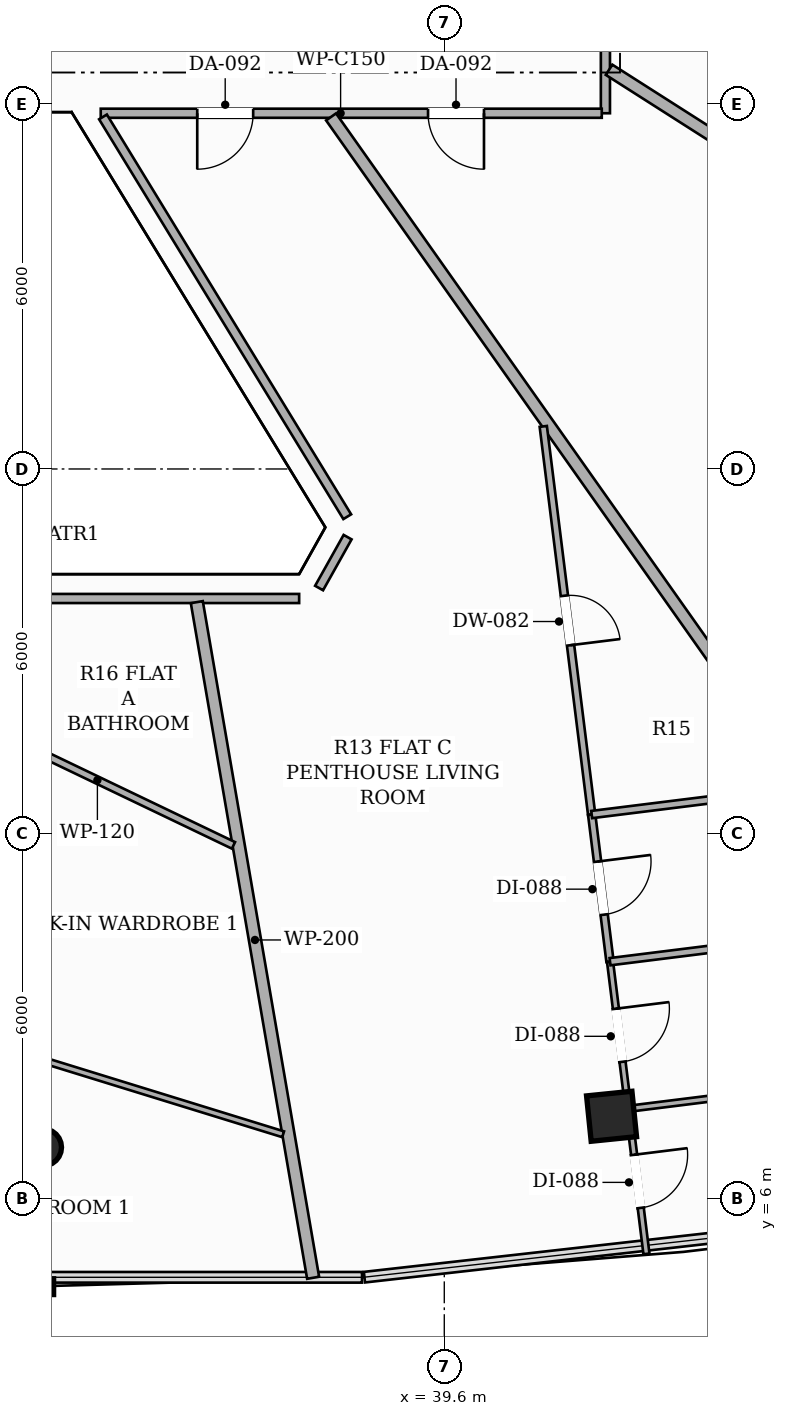
"""IFC4 building model, lengths in metres.
Left out: names, types, materials, properties, quantities, classifications, styles, units other than length and angle.
Written with IfcOpenShell. Run it as: python <this file> out.ifc"""

import sys

from ifc_helpers import new_model, si_unit, direction, frame, frame_2d, origin, origin_2d, place, context, subcontext, project, spatial, rectangle, hollow_rectangle, hollow_circle, extrude, element, fill, save


model = new_model("IFC4")
c1 = context("Model", 3, precision=1e-05, world=origin(), true_north=direction((0.0, 1.0)))
c2 = subcontext(c1, "Body", "Model", "MODEL_VIEW")
j1 = project(units=[si_unit("LENGTHUNIT", "METRE"), si_unit("PLANEANGLEUNIT", "RADIAN")], contexts=[c1])
p1 = place(None, origin())
s1 = spatial("IfcSite", under=j1, at=p1, CompositionType="ELEMENT")
p2 = place(p1, origin())
s2 = spatial("IfcBuilding", under=s1, at=p2, CompositionType="ELEMENT")
p3 = place(p2, frame((0.0, 0.0, 209.6)))
s3 = spatial("IfcBuildingStorey", under=s2, at=p3, CompositionType="ELEMENT", Elevation=209.6)
p4 = place(p3, frame((33.0, 6.844, 0.0), z_axis=(0.0, 0.0, 1.0), x_axis=(1.0, 0.0, 0.0)))
e1 = element("IfcColumn", 1, at=p4, inside=s3, PredefinedType="COLUMN", context=c2, shape_type="SweptSolid", body=[
    extrude(hollow_circle(Radius=0.305, WallThickness=0.016, at=origin_2d()), origin(), (0.0, 0.0, 1.0), 3.3),
])
p5 = place(p3, frame((42.351, 7.355, 0.0), z_axis=(0.0, 0.0, 1.0), x_axis=(0.994880708829, 0.101056297183, 0.0)))
e2 = element("IfcColumn", 2, at=p5, inside=s3, PredefinedType="COLUMN", context=c2, shape_type="SweptSolid", body=[
    extrude(hollow_rectangle(XDim=0.75, YDim=0.75, WallThickness=0.025, at=origin_2d()), origin(), (0.0, 0.0, 1.0), 3.3),
])
p6 = place(p3, frame((42.25, 26.59, 0.0), z_axis=(0.0, 0.0, 1.0), x_axis=(0.0, -1.0, 0.0)))
e3 = element("IfcWall", 3, at=p6, inside=s3, PredefinedType="PARTITIONING", context=c2, shape_type="SweptSolid", body=[
    extrude(rectangle(XDim=2.74, YDim=0.15, at=frame_2d((1.37, 0.0))), origin(), (0.0, 0.0, 1.0), 2.773),
])
p7 = place(p3, frame((42.19, 23.85, 0.0), z_axis=(0.0, 0.0, 1.0), x_axis=(-1.0, 0.0, 0.0)))
e4 = element("IfcWall", 4, at=p7, inside=s3, PredefinedType="PARTITIONING", context=c2, shape_type="SweptSolid", body=[
    extrude(rectangle(XDim=8.24, YDim=0.15, at=frame_2d((4.12, 0.0))), origin(), (0.0, 0.0, 1.0), 2.565),
])
p8 = place(p7, frame((1.937, 0.0, 0.0)))
e5 = element("IfcOpeningElement", 5, at=p8, cuts=e4, PredefinedType="OPENING", context=c2, shape_type="SweptSolid", body=[
    extrude(rectangle(XDim=0.92, YDim=2.15, at=frame_2d((0.46, 1.075))), frame((0.0, 0.085, 0.0), z_axis=(0.0, -1.0, 0.0), x_axis=(1.0, 0.0, 0.0)), (0.0, 0.0, 1.0), 0.17),
])
p9 = place(p7, frame((5.733, 0.0, 0.0)))
e6 = element("IfcOpeningElement", 6, at=p9, cuts=e4, PredefinedType="OPENING", context=c2, shape_type="SweptSolid", body=[
    extrude(rectangle(XDim=0.92, YDim=2.15, at=frame_2d((0.46, 1.075))), frame((0.0, 0.085, 0.0), z_axis=(0.0, -1.0, 0.0), x_axis=(1.0, 0.0, 0.0)), (0.0, 0.0, 1.0), 0.17),
])
p10 = place(p3, frame((33.987, 23.79, 0.0), z_axis=(0.0, 0.0, 1.0), x_axis=(0.521338496894, -0.853349970209, 0.0)))
e7 = element("IfcWall", 7, at=p10, inside=s3, PredefinedType="PARTITIONING", context=c2, shape_type="SweptSolid", body=[
    extrude(rectangle(XDim=7.705, YDim=0.15, at=frame_2d((3.853, 0.0))), origin(), (0.0, 0.0, 1.0), 2.773),
])
p11 = place(p3, frame((38.01, 16.879, 0.0), z_axis=(0.0, 0.0, 1.0), x_axis=(-0.488859069364, -0.872362774481, 0.0)))
e8 = element("IfcWall", 8, at=p11, inside=s3, PredefinedType="PARTITIONING", context=c2, shape_type="SweptSolid", body=[
    extrude(rectangle(XDim=0.959, YDim=0.15, at=frame_2d((0.48, 0.0))), origin(), (0.0, 0.0, 1.0), 3.06),
])
p12 = place(p3, frame((37.213, 15.87, 0.0), z_axis=(0.0, 0.0, 1.0), x_axis=(-1.0, 0.0, 0.0)))
e9 = element("IfcWall", 9, at=p12, inside=s3, PredefinedType="PARTITIONING", context=c2, shape_type="SweptSolid", body=[
    extrude(rectangle(XDim=8.426, YDim=0.15, at=frame_2d((4.213, 0.0))), origin(), (0.0, 0.0, 1.0), 2.773),
])
p13 = place(p3, frame((35.53, 15.81, 0.0), z_axis=(0.0, 0.0, 1.0), x_axis=(0.169681394536, -0.985498972272, 0.0)))
e10 = element("IfcWall", 10, at=p13, inside=s3, PredefinedType="PARTITIONING", context=c2, shape_type="SweptSolid", body=[
    extrude(rectangle(XDim=11.275, YDim=0.2, at=frame_2d((5.637, 0.0))), origin(), (0.0, 0.0, 1.0), 2.492),
])
p14 = place(p3, frame((50.316, 5.976, 0.0), z_axis=(0.0, 0.0, 1.0), x_axis=(-0.576784728977, 0.816896184603, 0.0)))
e11 = element("IfcWall", 11, at=p14, inside=s3, PredefinedType="PARTITIONING", context=c2, shape_type="SweptSolid", body=[
    extrude(rectangle(XDim=21.807, YDim=0.2, at=frame_2d((10.903, 0.0))), origin(), (0.0, 0.0, 1.0), 2.492),
])
p15 = place(p3, frame((42.31, 24.565, 0.0), z_axis=(0.0, 0.0, 1.0), x_axis=(0.843209388644, -0.537585274075, 0.0)))
e12 = element("IfcWall", 12, at=p15, inside=s3, PredefinedType="PARTITIONING", context=c2, shape_type="SweptSolid", body=[
    extrude(rectangle(XDim=12.816, YDim=0.2, at=frame_2d((6.408, 0.0))), origin(), (0.0, 0.0, 1.0), 2.492),
])
p16 = place(p3, frame((36.133, 11.81, 0.0), z_axis=(0.0, 0.0, 1.0), x_axis=(-0.901797658679, 0.432158515826, 0.0)))
e13 = element("IfcWall", 13, at=p16, inside=s3, PredefinedType="PARTITIONING", context=c2, shape_type="SweptSolid", body=[
    extrude(rectangle(XDim=4.964, YDim=0.12, at=frame_2d((2.482, 0.0))), origin(), (0.0, 0.0, 1.0), 2.773),
])
p17 = place(p3, frame((29.459, 9.37, 0.0), z_axis=(0.0, 0.0, 1.0), x_axis=(0.955559226726, -0.294799193044, 0.0)))
e14 = element("IfcWall", 14, at=p17, inside=s3, PredefinedType="PARTITIONING", context=c2, shape_type="SweptSolid", body=[
    extrude(rectangle(XDim=7.839, YDim=0.1, at=frame_2d((3.92, 0.0))), origin(), (0.0, 0.0, 1.0), 2.492),
])
p18 = place(p3, frame((41.228, 18.7, 0.0), z_axis=(0.0, 0.0, 1.0), x_axis=(0.123731094195, -0.992315784581, 0.0)))
e15 = element("IfcWall", 15, at=p18, inside=s3, PredefinedType="PARTITIONING", context=c2, shape_type="SweptSolid", body=[
    extrude(rectangle(XDim=6.432, YDim=0.12, at=frame_2d((3.216, 0.0))), origin(), (0.0, 0.0, 1.0), 3.06),
])
p19 = place(p18, frame((2.806, 0.0, 0.0)))
e16 = element("IfcOpeningElement", 16, at=p19, cuts=e15, PredefinedType="OPENING", context=c2, shape_type="SweptSolid", body=[
    extrude(rectangle(XDim=0.82, YDim=2.1, at=frame_2d((0.41, 1.05))), frame((0.0, 0.07, 0.0), z_axis=(0.0, -1.0, 0.0), x_axis=(1.0, 0.0, 0.0)), (0.0, 0.0, 1.0), 0.14),
])
p20 = place(p3, frame((42.024, 12.317, 0.0), z_axis=(0.0, 0.0, 1.0), x_axis=(0.123837590029, -0.992302499894, 0.0)))
e17 = element("IfcWall", 17, at=p20, inside=s3, PredefinedType="PARTITIONING", context=c2, shape_type="SweptSolid", body=[
    extrude(rectangle(XDim=2.439, YDim=0.12, at=frame_2d((1.219, 0.0))), origin(), (0.0, 0.0, 1.0), 3.06),
])
p21 = place(p20, frame((0.779, 0.0, 0.0)))
e18 = element("IfcOpeningElement", 18, at=p21, cuts=e17, PredefinedType="OPENING", context=c2, shape_type="SweptSolid", body=[
    extrude(rectangle(XDim=0.88, YDim=2.1, at=frame_2d((0.44, 1.05))), frame((0.0, 0.07, 0.0), z_axis=(0.0, -1.0, 0.0), x_axis=(1.0, 0.0, 0.0)), (0.0, 0.0, 1.0), 0.14),
])
p22 = place(p3, frame((42.628, 7.478, 0.0), z_axis=(0.0, 0.0, 1.0), x_axis=(0.123572330504, -0.992335567806, 0.0)))
e19 = element("IfcWall", 19, at=p22, inside=s3, PredefinedType="PARTITIONING", context=c2, shape_type="SweptSolid", body=[
    extrude(rectangle(XDim=2.404, YDim=0.1, at=frame_2d((1.202, 0.0))), origin(), (0.0, 0.0, 1.0), 2.492),
])
p23 = place(p22, frame((0.762, 0.0, 0.0)))
e20 = element("IfcOpeningElement", 20, at=p23, cuts=e19, PredefinedType="OPENING", context=c2, shape_type="SweptSolid", body=[
    extrude(rectangle(XDim=0.88, YDim=2.1, at=frame_2d((0.44, 1.05))), frame((0.0, 0.06, 0.0), z_axis=(0.0, -1.0, 0.0), x_axis=(1.0, 0.0, 0.0)), (0.0, 0.0, 1.0), 0.12),
])
p24 = place(p3, frame((42.326, 9.897, 0.0), z_axis=(0.0, 0.0, 1.0), x_axis=(0.123886817851, -0.992296355109, 0.0)))
e21 = element("IfcWall", 21, at=p24, inside=s3, PredefinedType="PARTITIONING", context=c2, shape_type="SweptSolid", body=[
    extrude(rectangle(XDim=2.438, YDim=0.1, at=frame_2d((1.219, 0.0))), origin(), (0.0, 0.0, 1.0), 2.492),
])
p25 = place(p24, frame((0.779, 0.0, 0.0)))
e22 = element("IfcOpeningElement", 22, at=p25, cuts=e21, PredefinedType="OPENING", context=c2, shape_type="SweptSolid", body=[
    extrude(rectangle(XDim=0.88, YDim=2.1, at=frame_2d((0.44, 1.05))), frame((0.0, 0.06, 0.0), z_axis=(0.0, -1.0, 0.0), x_axis=(1.0, 0.0, 0.0)), (0.0, 0.0, 1.0), 0.12),
])
p26 = place(p3, frame((45.435, 12.742, 0.0), z_axis=(0.0, 0.0, 1.0), x_axis=(-0.99232587892, -0.123650111308, 0.0)))
e23 = element("IfcWall", 23, at=p26, inside=s3, PredefinedType="PARTITIONING", context=c2, shape_type="SweptSolid", body=[
    extrude(rectangle(XDim=3.438, YDim=0.12, at=frame_2d((1.719, 0.0))), origin(), (0.0, 0.0, 1.0), 2.773),
])
p27 = place(p3, frame((47.029, 10.484, 0.0), z_axis=(0.0, 0.0, 1.0), x_axis=(-0.992303215116, -0.123831858863, 0.0)))
e24 = element("IfcWall", 24, at=p27, inside=s3, PredefinedType="PARTITIONING", context=c2, shape_type="SweptSolid", body=[
    extrude(rectangle(XDim=4.74, YDim=0.12, at=frame_2d((2.37, 0.0))), origin(), (0.0, 0.0, 1.0), 2.773),
])
p28 = place(p3, frame((42.628, 7.478, 0.0), z_axis=(0.0, 0.0, 1.0), x_axis=(0.992305206969, 0.123815896488, 0.0)))
e25 = element("IfcWall", 25, at=p28, inside=s3, PredefinedType="PARTITIONING", context=c2, shape_type="SweptSolid", body=[
    extrude(rectangle(XDim=6.042, YDim=0.1, at=frame_2d((3.021, 0.0))), origin(), (0.0, 0.0, 1.0), 2.492),
])
p29 = place(p8, origin())
e26 = element("IfcDoor", 26, at=p29, inside=s3, OperationType="SINGLE_SWING_LEFT", PredefinedType="DOOR", context=c2, shape_type="SweptSolid", body=[
    extrude(rectangle(XDim=0.92, YDim=2.15, at=frame_2d((0.46, 1.075))), frame((0.0, 0.025, 0.0), z_axis=(0.0, -1.0, 0.0), x_axis=(1.0, 0.0, 0.0)), (0.0, 0.0, 1.0), 0.05),
])
fill(e5, e26)
p30 = place(p9, origin())
e27 = element("IfcDoor", 27, at=p30, inside=s3, OperationType="SINGLE_SWING_RIGHT", PredefinedType="DOOR", context=c2, shape_type="SweptSolid", body=[
    extrude(rectangle(XDim=0.92, YDim=2.15, at=frame_2d((0.46, 1.075))), frame((0.0, 0.025, 0.0), z_axis=(0.0, -1.0, 0.0), x_axis=(1.0, 0.0, 0.0)), (0.0, 0.0, 1.0), 0.05),
])
fill(e6, e27)
p31 = place(p19, origin())
e28 = element("IfcDoor", 28, at=p31, inside=s3, OperationType="SINGLE_SWING_RIGHT", PredefinedType="DOOR", context=c2, shape_type="SweptSolid", body=[
    extrude(rectangle(XDim=0.82, YDim=2.1, at=frame_2d((0.41, 1.05))), frame((0.0, 0.025, 0.0), z_axis=(0.0, -1.0, 0.0), x_axis=(1.0, 0.0, 0.0)), (0.0, 0.0, 1.0), 0.05),
])
fill(e16, e28)
p32 = place(p21, origin())
e29 = element("IfcDoor", 29, at=p32, inside=s3, OperationType="SINGLE_SWING_LEFT", PredefinedType="DOOR", context=c2, shape_type="SweptSolid", body=[
    extrude(rectangle(XDim=0.88, YDim=2.1, at=frame_2d((0.44, 1.05))), frame((0.0, 0.025, 0.0), z_axis=(0.0, -1.0, 0.0), x_axis=(1.0, 0.0, 0.0)), (0.0, 0.0, 1.0), 0.05),
])
fill(e18, e29)
p33 = place(p23, origin())
e30 = element("IfcDoor", 30, at=p33, inside=s3, OperationType="SINGLE_SWING_LEFT", PredefinedType="DOOR", context=c2, shape_type="SweptSolid", body=[
    extrude(rectangle(XDim=0.88, YDim=2.1, at=frame_2d((0.44, 1.05))), frame((0.0, 0.025, 0.0), z_axis=(0.0, -1.0, 0.0), x_axis=(1.0, 0.0, 0.0)), (0.0, 0.0, 1.0), 0.05),
])
fill(e20, e30)
p34 = place(p25, origin())
e31 = element("IfcDoor", 31, at=p34, inside=s3, OperationType="SINGLE_SWING_LEFT", PredefinedType="DOOR", context=c2, shape_type="SweptSolid", body=[
    extrude(rectangle(XDim=0.88, YDim=2.1, at=frame_2d((0.44, 1.05))), frame((0.0, 0.025, 0.0), z_axis=(0.0, -1.0, 0.0), x_axis=(1.0, 0.0, 0.0)), (0.0, 0.0, 1.0), 0.05),
])
fill(e22, e31)
save(model, sys.argv[1])
